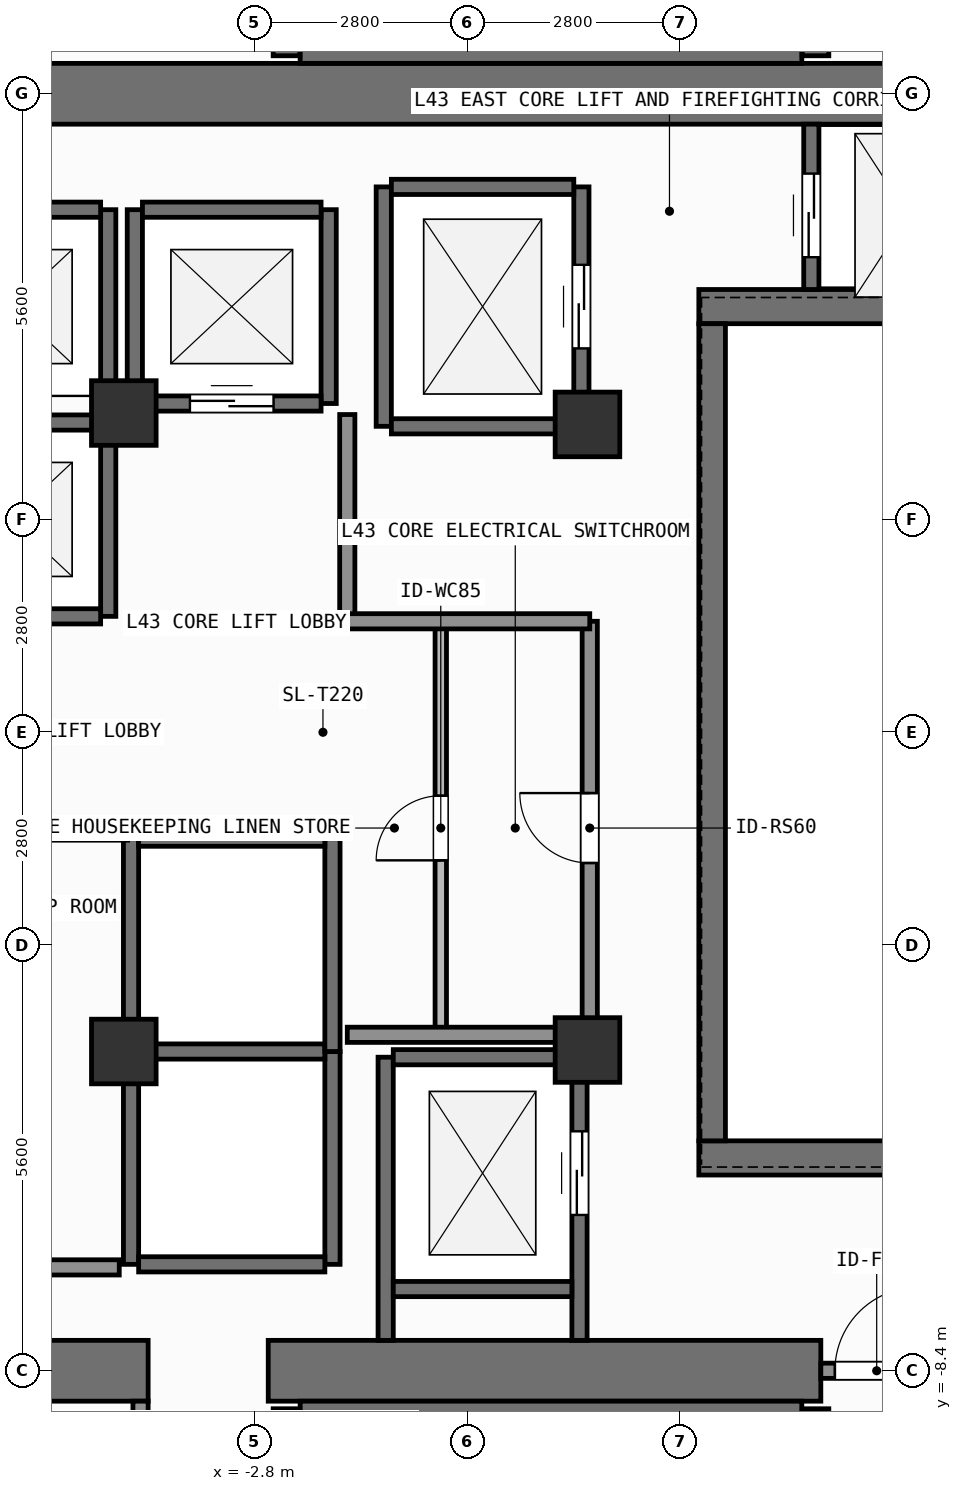
"""IFC4 building model, lengths in metres.
Left out: names, types, materials, properties, quantities, classifications, styles, units other than length and angle.
Written with IfcOpenShell. Run it as: python <this file> out.ifc"""

import sys

from ifc_helpers import new_model, si_unit, direction, frame, frame_2d, origin, origin_2d, place, context, subcontext, project, spatial, rectangle, extrude, element, fill, save


model = new_model("IFC4")
c1 = context("Model", 3, precision=1e-05, world=origin(), true_north=direction((0.0, 1.0)))
c2 = subcontext(c1, "Body", "Model", "MODEL_VIEW")
j1 = project(units=[si_unit("LENGTHUNIT", "METRE"), si_unit("PLANEANGLEUNIT", "RADIAN")], contexts=[c1])
p1 = place(None, origin())
s1 = spatial("IfcSite", under=j1, at=p1, CompositionType="ELEMENT")
p2 = place(p1, origin())
s2 = spatial("IfcBuilding", under=s1, at=p2, CompositionType="ELEMENT")
p3 = place(p2, frame((0.0, 0.0, 175.8)))
s3 = spatial("IfcBuildingStorey", under=s2, at=p3, CompositionType="ELEMENT", Elevation=175.8)
p4 = place(p3, frame((-7.55, -8.4, 0.0), z_axis=(0.0, 0.0, 1.0), x_axis=(1.0, 0.0, 0.0)))
e1 = element("IfcWall", 1, at=p4, inside=s3, PredefinedType="SHEAR", context=c2, shape_type="SweptSolid", body=[
    extrude(rectangle(XDim=3.35, YDim=0.8, at=frame_2d((1.675, 0.0))), origin(), (0.0, 0.0, 1.0), 3.9),
])
p5 = place(p3, frame((-2.62, -8.4, 0.0), z_axis=(0.0, 0.0, 1.0), x_axis=(1.0, 0.0, 0.0)))
e2 = element("IfcWall", 2, at=p5, inside=s3, PredefinedType="SHEAR", context=c2, shape_type="SweptSolid", body=[
    extrude(rectangle(XDim=7.27, YDim=0.8, at=frame_2d((3.635, 0.0))), origin(), (0.0, 0.0, 1.0), 3.9),
])
p6 = place(p3, frame((-7.55, 8.4, 0.0), z_axis=(0.0, 0.0, 1.0), x_axis=(1.0, 0.0, 0.0)))
e3 = element("IfcWall", 3, at=p6, inside=s3, PredefinedType="SHEAR", context=c2, shape_type="SweptSolid", body=[
    extrude(rectangle(XDim=16.35, YDim=0.8, at=frame_2d((8.175, 0.0))), origin(), (0.0, 0.0, 1.0), 3.9),
])
for number, where, z_axis, x_axis in (
    (4, (3.045, -5.6, 0.0), (0.0, 0.0, 1.0), (1.0, 0.0, 0.0)),
    (5, (3.045, 5.6, 0.0), (0.0, 0.0, 1.0), (1.0, 0.0, 0.0)),
):
    element("IfcWall", number, at=place(p3, frame(where, z_axis=z_axis, x_axis=x_axis)), inside=s3, PredefinedType="SHEAR", context=c2, shape_type="SweptSolid", body=[
        extrude(rectangle(XDim=5.755, YDim=0.45, at=frame_2d((2.877, 0.0))), origin(), (0.0, 0.0, 1.0), 3.9),
    ])
p7 = place(p3, frame((3.22, -5.375, 0.0), z_axis=(0.0, 0.0, 1.0), x_axis=(0.0, 1.0, 0.0)))
e6 = element("IfcWall", 6, at=p7, inside=s3, PredefinedType="SHEAR", context=c2, shape_type="SweptSolid", body=[
    extrude(rectangle(XDim=10.75, YDim=0.35, at=frame_2d((5.375, 0.0))), origin(), (0.0, 0.0, 1.0), 3.9),
])
p8 = place(p3, frame((-2.2, -8.913, 0.0), z_axis=(0.0, 0.0, 1.0), x_axis=(1.0, 0.0, 0.0)))
e7 = element("IfcWall", 7, at=p8, inside=s3, PredefinedType="SHEAR", context=c2, shape_type="SweptSolid", body=[
    extrude(rectangle(XDim=6.6, YDim=0.225, at=frame_2d((3.3, 0.0))), origin(), (0.0, 0.0, 1.0), 3.9),
])
p9 = place(p3, frame((-2.38, -11.825, 0.0), z_axis=(0.0, 0.0, 1.0), x_axis=(0.0, 1.0, 0.0)))
e8 = element("IfcWall", 8, at=p9, inside=s3, PredefinedType="SHEAR", context=c2, shape_type="SweptSolid", body=[
    extrude(rectangle(XDim=2.925, YDim=0.35, at=frame_2d((1.462, 0.0))), origin(), (0.0, 0.0, 1.0), 3.9),
])
p10 = place(p3, frame((4.58, -8.9, 0.0), z_axis=(0.0, 0.0, 1.0), x_axis=(0.0, -1.0, 0.0)))
e9 = element("IfcWall", 9, at=p10, inside=s3, PredefinedType="SHEAR", context=c2, shape_type="SweptSolid", body=[
    extrude(rectangle(XDim=2.925, YDim=0.35, at=frame_2d((1.462, 0.0))), origin(), (0.0, 0.0, 1.0), 3.9),
])
p11 = place(p10, frame((0.913, 0.0, 0.0)))
e10 = element("IfcOpeningElement", 10, at=p11, cuts=e9, PredefinedType="OPENING", context=c2, shape_type="SweptSolid", body=[
    extrude(rectangle(XDim=1.1, YDim=2.15, at=frame_2d((0.55, 1.075))), frame((0.0, 0.185, 0.0), z_axis=(0.0, -1.0, 0.0), x_axis=(1.0, 0.0, 0.0)), (0.0, 0.0, 1.0), 0.37),
])
p12 = place(p3, frame((-2.2, 8.913, 0.0), z_axis=(0.0, 0.0, 1.0), x_axis=(1.0, 0.0, 0.0)))
e11 = element("IfcWall", 11, at=p12, inside=s3, PredefinedType="SHEAR", context=c2, shape_type="SweptSolid", body=[
    extrude(rectangle(XDim=6.6, YDim=0.225, at=frame_2d((3.3, 0.0))), origin(), (0.0, 0.0, 1.0), 3.9),
])
p13 = place(p3, frame((-2.38, 8.9, 0.0), z_axis=(0.0, 0.0, 1.0), x_axis=(0.0, 1.0, 0.0)))
e12 = element("IfcWall", 12, at=p13, inside=s3, PredefinedType="SHEAR", context=c2, shape_type="SweptSolid", body=[
    extrude(rectangle(XDim=2.925, YDim=0.35, at=frame_2d((1.462, 0.0))), origin(), (0.0, 0.0, 1.0), 3.9),
])
p14 = place(p3, frame((4.58, 11.825, 0.0), z_axis=(0.0, 0.0, 1.0), x_axis=(0.0, -1.0, 0.0)))
e13 = element("IfcWall", 13, at=p14, inside=s3, PredefinedType="SHEAR", context=c2, shape_type="SweptSolid", body=[
    extrude(rectangle(XDim=2.925, YDim=0.35, at=frame_2d((1.462, 0.0))), origin(), (0.0, 0.0, 1.0), 3.9),
])
p15 = place(p14, frame((0.913, 0.0, 0.0)))
e14 = element("IfcOpeningElement", 14, at=p15, cuts=e13, PredefinedType="OPENING", context=c2, shape_type="SweptSolid", body=[
    extrude(rectangle(XDim=1.1, YDim=2.15, at=frame_2d((0.55, 1.075))), frame((0.0, 0.185, 0.0), z_axis=(0.0, -1.0, 0.0), x_axis=(1.0, 0.0, 0.0)), (0.0, 0.0, 1.0), 0.37),
])
for number, where, z_axis, x_axis in (
    (15, (-4.52, -4.2, 0.0), (0.0, 0.0, 1.0), (1.0, 0.0, 0.0)),
    (16, (1.58, -4.18, 0.0), (0.0, 0.0, 1.0), (1.0, 0.0, 0.0)),
    (17, (1.58, 4.05, 0.0), (0.0, 0.0, 1.0), (1.0, 0.0, 0.0)),
    (18, (-4.52, 4.2, 0.0), (0.0, 0.0, 1.0), (1.0, 0.0, 0.0)),
):
    element("IfcColumn", number, at=place(p3, frame(where, z_axis=z_axis, x_axis=x_axis)), inside=s3, PredefinedType="COLUMN", context=c2, shape_type="SweptSolid", body=[
        extrude(rectangle(XDim=0.85, YDim=0.85, at=origin_2d()), origin(), (0.0, 0.0, 1.0), 3.9),
    ])
p16 = place(p3, frame((-4.725, 1.525, 0.0), z_axis=(0.0, 0.0, 1.0), x_axis=(0.0, 1.0, 0.0)))
e19 = element("IfcWall", 19, at=p16, inside=s3, PredefinedType="SHEAR", context=c2, shape_type="SweptSolid", body=[
    extrude(rectangle(XDim=2.55, YDim=0.2, at=frame_2d((1.275, 0.0))), origin(), (0.0, 0.0, 1.0), 3.68),
])
for number, where, z_axis, x_axis in (
    (20, (-7.175, 1.525, 0.0), (0.0, 0.0, 1.0), (1.0, 0.0, 0.0)),
    (21, (-7.175, 4.075, 0.0), (0.0, 0.0, 1.0), (1.0, 0.0, 0.0)),
):
    element("IfcWall", number, at=place(p3, frame(where, z_axis=z_axis, x_axis=x_axis)), inside=s3, PredefinedType="SHEAR", context=c2, shape_type="SweptSolid", body=[
        extrude(rectangle(XDim=2.35, YDim=0.2, at=frame_2d((1.175, 0.0))), origin(), (0.0, 0.0, 1.0), 3.68),
    ])
p17 = place(p3, frame((-4.725, 4.075, 0.0), z_axis=(0.0, 0.0, 1.0), x_axis=(0.0, 1.0, 0.0)))
e22 = element("IfcWall", 22, at=p17, inside=s3, PredefinedType="SHEAR", context=c2, shape_type="SweptSolid", body=[
    extrude(rectangle(XDim=2.8, YDim=0.2, at=frame_2d((1.4, 0.0))), origin(), (0.0, 0.0, 1.0), 3.68),
])
p18 = place(p3, frame((-7.175, 6.875, 0.0), z_axis=(0.0, 0.0, 1.0), x_axis=(1.0, 0.0, 0.0)))
e23 = element("IfcWall", 23, at=p18, inside=s3, PredefinedType="SHEAR", context=c2, shape_type="SweptSolid", body=[
    extrude(rectangle(XDim=2.35, YDim=0.2, at=frame_2d((1.175, 0.0))), origin(), (0.0, 0.0, 1.0), 3.68),
])
for number, where, z_axis, x_axis in (
    (24, (-4.375, 4.325, 0.0), (0.0, 0.0, 1.0), (0.0, 1.0, 0.0)),
    (25, (-1.825, 4.325, 0.0), (0.0, 0.0, 1.0), (0.0, 1.0, 0.0)),
):
    element("IfcWall", number, at=place(p3, frame(where, z_axis=z_axis, x_axis=x_axis)), inside=s3, PredefinedType="SHEAR", context=c2, shape_type="SweptSolid", body=[
        extrude(rectangle(XDim=2.55, YDim=0.2, at=frame_2d((1.275, 0.0))), origin(), (0.0, 0.0, 1.0), 3.68),
    ])
p19 = place(p3, frame((-4.275, 4.325, 0.0), z_axis=(0.0, 0.0, 1.0), x_axis=(1.0, 0.0, 0.0)))
e26 = element("IfcWall", 26, at=p19, inside=s3, PredefinedType="SHEAR", context=c2, shape_type="SweptSolid", body=[
    extrude(rectangle(XDim=2.35, YDim=0.2, at=frame_2d((1.175, 0.0))), origin(), (0.0, 0.0, 1.0), 3.68),
])
p20 = place(p19, frame((0.625, 0.0, 0.0)))
e27 = element("IfcOpeningElement", 27, at=p20, cuts=e26, PredefinedType="OPENING", context=c2, shape_type="SweptSolid", body=[
    extrude(rectangle(XDim=1.1, YDim=2.2, at=frame_2d((0.55, 1.1))), frame((0.0, 0.11, 0.0), z_axis=(0.0, -1.0, 0.0), x_axis=(1.0, 0.0, 0.0)), (0.0, 0.0, 1.0), 0.22),
])
p21 = place(p3, frame((-4.275, 6.875, 0.0), z_axis=(0.0, 0.0, 1.0), x_axis=(1.0, 0.0, 0.0)))
e28 = element("IfcWall", 28, at=p21, inside=s3, PredefinedType="SHEAR", context=c2, shape_type="SweptSolid", body=[
    extrude(rectangle(XDim=2.35, YDim=0.2, at=frame_2d((1.175, 0.0))), origin(), (0.0, 0.0, 1.0), 3.68),
])
for number, where, z_axis, x_axis in (
    (29, (-4.425, -7.0, 0.0), (0.0, 0.0, 1.0), (0.0, 1.0, 0.0)),
    (30, (-1.775, -7.0, 0.0), (0.0, 0.0, 1.0), (0.0, 1.0, 0.0)),
):
    element("IfcWall", number, at=place(p3, frame(where, z_axis=z_axis, x_axis=x_axis)), inside=s3, PredefinedType="SHEAR", context=c2, shape_type="SweptSolid", body=[
        extrude(rectangle(XDim=2.8, YDim=0.2, at=frame_2d((1.4, 0.0))), origin(), (0.0, 0.0, 1.0), 3.68),
    ])
for number, where, z_axis, x_axis in (
    (31, (-4.325, -7.0, 0.0), (0.0, 0.0, 1.0), (1.0, 0.0, 0.0)),
    (32, (-4.325, -4.2, 0.0), (0.0, 0.0, 1.0), (1.0, 0.0, 0.0)),
):
    element("IfcWall", number, at=place(p3, frame(where, z_axis=z_axis, x_axis=x_axis)), inside=s3, PredefinedType="SHEAR", context=c2, shape_type="SweptSolid", body=[
        extrude(rectangle(XDim=2.45, YDim=0.2, at=frame_2d((1.225, 0.0))), origin(), (0.0, 0.0, 1.0), 3.68),
    ])
for number, where, z_axis, x_axis in (
    (33, (-4.425, -4.2, 0.0), (0.0, 0.0, 1.0), (0.0, 1.0, 0.0)),
    (34, (-1.775, -4.2, 0.0), (0.0, 0.0, 1.0), (0.0, 1.0, 0.0)),
):
    element("IfcWall", number, at=place(p3, frame(where, z_axis=z_axis, x_axis=x_axis)), inside=s3, PredefinedType="SHEAR", context=c2, shape_type="SweptSolid", body=[
        extrude(rectangle(XDim=2.8, YDim=0.2, at=frame_2d((1.4, 0.0))), origin(), (0.0, 0.0, 1.0), 3.68),
    ])
p22 = place(p3, frame((-4.325, -1.4, 0.0), z_axis=(0.0, 0.0, 1.0), x_axis=(1.0, 0.0, 0.0)))
e35 = element("IfcWall", 35, at=p22, inside=s3, PredefinedType="SHEAR", context=c2, shape_type="SweptSolid", body=[
    extrude(rectangle(XDim=2.45, YDim=0.2, at=frame_2d((1.225, 0.0))), origin(), (0.0, 0.0, 1.0), 3.68),
])
p23 = place(p3, frame((-1.1, 4.025, 0.0), z_axis=(0.0, 0.0, 1.0), x_axis=(0.0, 1.0, 0.0)))
e36 = element("IfcWall", 36, at=p23, inside=s3, PredefinedType="SHEAR", context=c2, shape_type="SweptSolid", body=[
    extrude(rectangle(XDim=3.15, YDim=0.2, at=frame_2d((1.575, 0.0))), origin(), (0.0, 0.0, 1.0), 3.68),
])
p24 = place(p3, frame((1.5, 4.025, 0.0), z_axis=(0.0, 0.0, 1.0), x_axis=(0.0, 1.0, 0.0)))
e37 = element("IfcWall", 37, at=p24, inside=s3, PredefinedType="SHEAR", context=c2, shape_type="SweptSolid", body=[
    extrude(rectangle(XDim=3.15, YDim=0.2, at=frame_2d((1.575, 0.0))), origin(), (0.0, 0.0, 1.0), 3.68),
])
p25 = place(p24, frame((1.025, 0.0, 0.0)))
e38 = element("IfcOpeningElement", 38, at=p25, cuts=e37, PredefinedType="OPENING", context=c2, shape_type="SweptSolid", body=[
    extrude(rectangle(XDim=1.1, YDim=2.2, at=frame_2d((0.55, 1.1))), frame((0.0, 0.11, 0.0), z_axis=(0.0, -1.0, 0.0), x_axis=(1.0, 0.0, 0.0)), (0.0, 0.0, 1.0), 0.22),
])
for number, where, z_axis, x_axis in (
    (39, (-1.0, 4.025, 0.0), (0.0, 0.0, 1.0), (1.0, 0.0, 0.0)),
    (40, (-1.0, 7.175, 0.0), (0.0, 0.0, 1.0), (1.0, 0.0, 0.0)),
):
    element("IfcWall", number, at=place(p3, frame(where, z_axis=z_axis, x_axis=x_axis)), inside=s3, PredefinedType="SHEAR", context=c2, shape_type="SweptSolid", body=[
        extrude(rectangle(XDim=2.4, YDim=0.2, at=frame_2d((1.2, 0.0))), origin(), (0.0, 0.0, 1.0), 3.68),
    ])
p26 = place(p3, frame((-1.075, -8.0, 0.0), z_axis=(0.0, 0.0, 1.0), x_axis=(0.0, 1.0, 0.0)))
e41 = element("IfcWall", 41, at=p26, inside=s3, PredefinedType="SHEAR", context=c2, shape_type="SweptSolid", body=[
    extrude(rectangle(XDim=3.725, YDim=0.2, at=frame_2d((1.863, 0.0))), origin(), (0.0, 0.0, 1.0), 3.68),
])
p27 = place(p3, frame((1.475, -8.0, 0.0), z_axis=(0.0, 0.0, 1.0), x_axis=(0.0, 1.0, 0.0)))
e42 = element("IfcWall", 42, at=p27, inside=s3, PredefinedType="SHEAR", context=c2, shape_type="SweptSolid", body=[
    extrude(rectangle(XDim=3.725, YDim=0.2, at=frame_2d((1.863, 0.0))), origin(), (0.0, 0.0, 1.0), 3.68),
])
p28 = place(p27, frame((1.65, 0.0, 0.0)))
e43 = element("IfcOpeningElement", 43, at=p28, cuts=e42, PredefinedType="OPENING", context=c2, shape_type="SweptSolid", body=[
    extrude(rectangle(XDim=1.1, YDim=2.2, at=frame_2d((0.55, 1.1))), frame((0.0, 0.11, 0.0), z_axis=(0.0, -1.0, 0.0), x_axis=(1.0, 0.0, 0.0)), (0.0, 0.0, 1.0), 0.22),
])
for number, where, z_axis, x_axis in (
    (44, (-0.975, -7.325, 0.0), (0.0, 0.0, 1.0), (1.0, 0.0, 0.0)),
    (45, (-0.975, -4.275, 0.0), (0.0, 0.0, 1.0), (1.0, 0.0, 0.0)),
):
    element("IfcWall", number, at=place(p3, frame(where, z_axis=z_axis, x_axis=x_axis)), inside=s3, PredefinedType="SHEAR", context=c2, shape_type="SweptSolid", body=[
        extrude(rectangle(XDim=2.35, YDim=0.2, at=frame_2d((1.175, 0.0))), origin(), (0.0, 0.0, 1.0), 3.68),
    ])
p29 = place(p3, frame((4.525, 5.825, 0.0), z_axis=(0.0, 0.0, 1.0), x_axis=(0.0, 1.0, 0.0)))
e46 = element("IfcWall", 46, at=p29, inside=s3, PredefinedType="SHEAR", context=c2, shape_type="SweptSolid", body=[
    extrude(rectangle(XDim=2.175, YDim=0.2, at=frame_2d((1.087, 0.0))), origin(), (0.0, 0.0, 1.0), 3.68),
])
p30 = place(p29, frame((0.425, 0.0, 0.0)))
e47 = element("IfcOpeningElement", 47, at=p30, cuts=e46, PredefinedType="OPENING", context=c2, shape_type="SweptSolid", body=[
    extrude(rectangle(XDim=1.1, YDim=2.2, at=frame_2d((0.55, 1.1))), frame((0.0, 0.11, 0.0), z_axis=(0.0, -1.0, 0.0), x_axis=(1.0, 0.0, 0.0)), (0.0, 0.0, 1.0), 0.22),
])
p31 = place(p3, frame((4.65, -8.4, 0.0), z_axis=(0.0, 0.0, 1.0), x_axis=(1.0, 0.0, 0.0)))
e48 = element("IfcWall", 48, at=p31, inside=s3, PredefinedType="SOLIDWALL", context=c2, shape_type="SweptSolid", body=[
    extrude(rectangle(XDim=1.47, YDim=0.2, at=frame_2d((0.735, 0.0))), origin(), (0.0, 0.0, 1.0), 2.82),
])
p32 = place(p31, frame((0.185, 0.0, 0.0)))
e49 = element("IfcOpeningElement", 49, at=p32, cuts=e48, PredefinedType="OPENING", context=c2, shape_type="SweptSolid", body=[
    extrude(rectangle(XDim=1.1, YDim=2.15, at=frame_2d((0.55, 1.075))), frame((0.0, 0.11, 0.0), z_axis=(0.0, -1.0, 0.0), x_axis=(1.0, 0.0, 0.0)), (0.0, 0.0, 1.0), 0.22),
])
p33 = place(p3, frame((-0.35, -3.98, 0.0), z_axis=(0.0, 0.0, 1.0), x_axis=(0.0, 1.0, 0.0)))
e50 = element("IfcWall", 50, at=p33, inside=s3, PredefinedType="PARTITIONING", context=c2, shape_type="SweptSolid", body=[
    extrude(rectangle(XDim=5.44, YDim=0.15, at=frame_2d((2.72, 0.0))), origin(), (0.0, 0.0, 1.0), 3.68),
])
p34 = place(p33, frame((2.295, 0.0, 0.0)))
e51 = element("IfcOpeningElement", 51, at=p34, cuts=e50, PredefinedType="OPENING", context=c2, shape_type="SweptSolid", body=[
    extrude(rectangle(XDim=0.85, YDim=2.1, at=frame_2d((0.425, 1.05))), frame((0.0, 0.085, 0.0), z_axis=(0.0, -1.0, 0.0), x_axis=(1.0, 0.0, 0.0)), (0.0, 0.0, 1.0), 0.17),
])
p35 = place(p3, frame((1.61, -3.98, 0.0), z_axis=(0.0, 0.0, 1.0), x_axis=(0.0, 1.0, 0.0)))
e52 = element("IfcWall", 52, at=p35, inside=s3, PredefinedType="SOLIDWALL", context=c2, shape_type="SweptSolid", body=[
    extrude(rectangle(XDim=5.44, YDim=0.2, at=frame_2d((2.72, 0.0))), origin(), (0.0, 0.0, 1.0), 3.68),
])
p36 = place(p35, frame((2.26, 0.0, 0.0)))
e53 = element("IfcOpeningElement", 53, at=p36, cuts=e52, PredefinedType="OPENING", context=c2, shape_type="SweptSolid", body=[
    extrude(rectangle(XDim=0.92, YDim=2.1, at=frame_2d((0.46, 1.05))), frame((0.0, 0.11, 0.0), z_axis=(0.0, -1.0, 0.0), x_axis=(1.0, 0.0, 0.0)), (0.0, 0.0, 1.0), 0.22),
])
p37 = place(p3, frame((-4.3, -12.06, 0.0), z_axis=(0.0, 0.0, 1.0), x_axis=(0.0, 1.0, 0.0)))
e54 = element("IfcWall", 54, at=p37, inside=s3, PredefinedType="SOLIDWALL", context=c2, shape_type="SweptSolid", body=[
    extrude(rectangle(XDim=3.26, YDim=0.2, at=frame_2d((1.63, 0.0))), origin(), (0.0, 0.0, 1.0), 3.68),
])
p38 = place(p3, frame((-7.38, -1.32, 0.0), z_axis=(0.0, 0.0, 1.0), x_axis=(1.0, 0.0, 0.0)))
e55 = element("IfcWall", 55, at=p38, inside=s3, PredefinedType="SOLIDWALL", context=c2, shape_type="SweptSolid", body=[
    extrude(rectangle(XDim=2.91, YDim=0.2, at=frame_2d((1.455, 0.0))), origin(), (0.0, 0.0, 1.0), 3.68),
])
p39 = place(p3, frame((-1.58, 1.48, 0.0), z_axis=(0.0, 0.0, 1.0), x_axis=(0.0, 1.0, 0.0)))
e56 = element("IfcWall", 56, at=p39, inside=s3, PredefinedType="SOLIDWALL", context=c2, shape_type="SweptSolid", body=[
    extrude(rectangle(XDim=2.7, YDim=0.2, at=frame_2d((1.35, 0.0))), origin(), (0.0, 0.0, 1.0), 3.68),
])
for number, where, z_axis, x_axis in (
    (57, (-1.58, -3.98, 0.0), (0.0, 0.0, 1.0), (1.0, 0.0, 0.0)),
    (58, (-1.58, 1.46, 0.0), (0.0, 0.0, 1.0), (1.0, 0.0, 0.0)),
):
    element("IfcWall", number, at=place(p3, frame(where, z_axis=z_axis, x_axis=x_axis)), inside=s3, PredefinedType="SOLIDWALL", context=c2, shape_type="SweptSolid", body=[
        extrude(rectangle(XDim=3.19, YDim=0.2, at=frame_2d((1.595, 0.0))), origin(), (0.0, 0.0, 1.0), 3.68),
    ])
p40 = place(p3, frame((-7.38, -7.04, 0.0), z_axis=(0.0, 0.0, 1.0), x_axis=(1.0, 0.0, 0.0)))
e59 = element("IfcWall", 59, at=p40, inside=s3, PredefinedType="SOLIDWALL", context=c2, shape_type="SweptSolid", body=[
    extrude(rectangle(XDim=2.8, YDim=0.2, at=frame_2d((1.4, 0.0))), origin(), (0.0, 0.0, 1.0), 3.68),
])
p41 = place(p20, origin())
e60 = element("IfcDoor", 60, at=p41, inside=s3, OperationType="SLIDING_TO_LEFT", PredefinedType="DOOR", context=c2, shape_type="SweptSolid", body=[
    extrude(rectangle(XDim=1.1, YDim=2.2, at=frame_2d((0.55, 1.1))), frame((0.0, 0.025, 0.0), z_axis=(0.0, -1.0, 0.0), x_axis=(1.0, 0.0, 0.0)), (0.0, 0.0, 1.0), 0.05),
])
fill(e27, e60)
p42 = place(p25, origin())
e61 = element("IfcDoor", 61, at=p42, inside=s3, OperationType="SLIDING_TO_LEFT", PredefinedType="DOOR", context=c2, shape_type="SweptSolid", body=[
    extrude(rectangle(XDim=1.1, YDim=2.2, at=frame_2d((0.55, 1.1))), frame((0.0, 0.025, 0.0), z_axis=(0.0, -1.0, 0.0), x_axis=(1.0, 0.0, 0.0)), (0.0, 0.0, 1.0), 0.05),
])
fill(e38, e61)
p43 = place(p28, origin())
e62 = element("IfcDoor", 62, at=p43, inside=s3, OperationType="SLIDING_TO_LEFT", PredefinedType="DOOR", context=c2, shape_type="SweptSolid", body=[
    extrude(rectangle(XDim=1.1, YDim=2.2, at=frame_2d((0.55, 1.1))), frame((0.0, 0.025, 0.0), z_axis=(0.0, -1.0, 0.0), x_axis=(1.0, 0.0, 0.0)), (0.0, 0.0, 1.0), 0.05),
])
fill(e43, e62)
p44 = place(p30, origin())
e63 = element("IfcDoor", 63, at=p44, inside=s3, OperationType="SLIDING_TO_LEFT", PredefinedType="DOOR", context=c2, shape_type="SweptSolid", body=[
    extrude(rectangle(XDim=1.1, YDim=2.2, at=frame_2d((0.55, 1.1))), frame((0.0, 0.025, 0.0), z_axis=(0.0, -1.0, 0.0), x_axis=(1.0, 0.0, 0.0)), (0.0, 0.0, 1.0), 0.05),
])
fill(e47, e63)
p45 = place(p32, origin())
e64 = element("IfcDoor", 64, at=p45, inside=s3, OperationType="SINGLE_SWING_RIGHT", PredefinedType="DOOR", context=c2, shape_type="SweptSolid", body=[
    extrude(rectangle(XDim=1.1, YDim=2.15, at=frame_2d((0.55, 1.075))), frame((0.0, 0.025, 0.0), z_axis=(0.0, -1.0, 0.0), x_axis=(1.0, 0.0, 0.0)), (0.0, 0.0, 1.0), 0.05),
])
fill(e49, e64)
p46 = place(p34, origin())
e65 = element("IfcDoor", 65, at=p46, inside=s3, OperationType="SINGLE_SWING_LEFT", PredefinedType="DOOR", context=c2, shape_type="SweptSolid", body=[
    extrude(rectangle(XDim=0.85, YDim=2.1, at=frame_2d((0.425, 1.05))), frame((0.0, 0.025, 0.0), z_axis=(0.0, -1.0, 0.0), x_axis=(1.0, 0.0, 0.0)), (0.0, 0.0, 1.0), 0.05),
])
fill(e51, e65)
p47 = place(p36, origin())
e66 = element("IfcDoor", 66, at=p47, inside=s3, OperationType="SINGLE_SWING_RIGHT", PredefinedType="DOOR", context=c2, shape_type="SweptSolid", body=[
    extrude(rectangle(XDim=0.92, YDim=2.1, at=frame_2d((0.46, 1.05))), frame((0.0, 0.025, 0.0), z_axis=(0.0, -1.0, 0.0), x_axis=(1.0, 0.0, 0.0)), (0.0, 0.0, 1.0), 0.05),
])
fill(e53, e66)
save(model, sys.argv[1])
